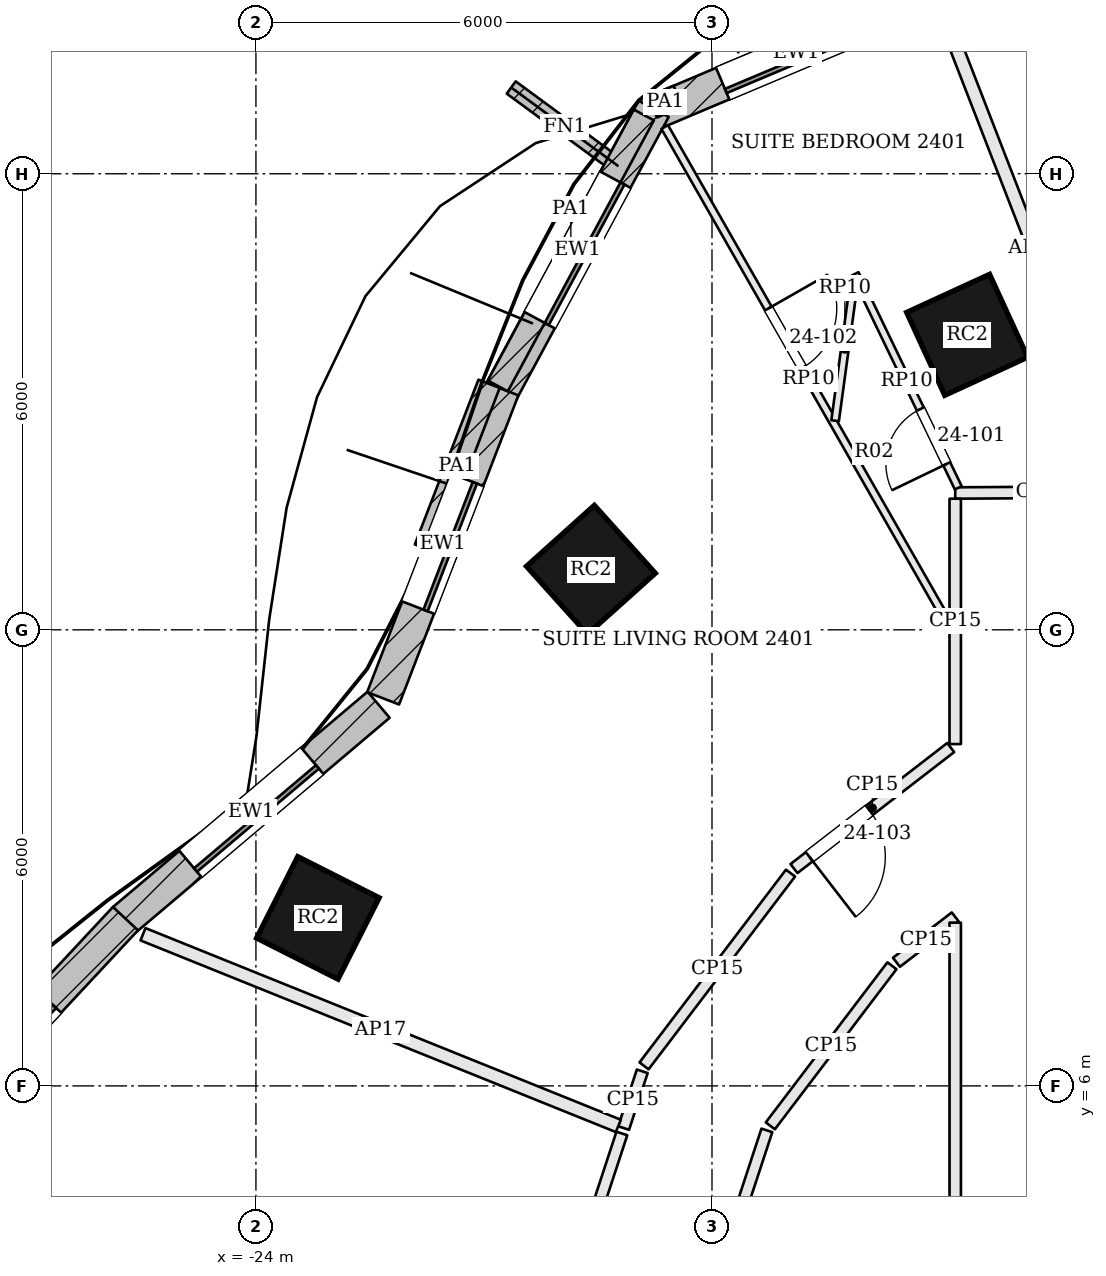
"""IFC4 building model, lengths in metres.
Left out: names, types, materials, properties, quantities, classifications, styles, units other than length and angle.
Written with IfcOpenShell. Run it as: python <this file> out.ifc"""

import sys

from ifc_helpers import new_model, si_unit, direction, frame, frame_2d, origin, origin_2d, place, context, subcontext, project, spatial, rectangle, extrude, element, fill, save


model = new_model("IFC4")
c1 = context("Model", 3, precision=1e-05, world=origin(), true_north=direction((0.0, 1.0)))
c2 = subcontext(c1, "Body", "Model", "MODEL_VIEW")
j1 = project(units=[si_unit("LENGTHUNIT", "METRE"), si_unit("PLANEANGLEUNIT", "RADIAN")], contexts=[c1])
p1 = place(None, origin())
s1 = spatial("IfcSite", under=j1, at=p1, CompositionType="ELEMENT")
p2 = place(p1, origin())
s2 = spatial("IfcBuilding", under=s1, at=p2, CompositionType="ELEMENT")
p3 = place(p2, frame((0.0, 0.0, 103.2)))
s3 = spatial("IfcBuildingStorey", under=s2, at=p3, CompositionType="ELEMENT", Elevation=103.2)
for number, where, z_axis, x_axis in (
    (1, (-14.643, 15.881, 0.0), (0.0, 0.0, 1.0), (-0.909, -0.417, 0.0)),
    (2, (-19.593, 12.79, 0.0), (0.0, 0.0, 1.0), (-0.744, -0.668, 0.0)),
    (3, (-23.185, 8.21, 0.0), (0.0, 0.0, 1.0), (-0.451, -0.893, 0.0)),
):
    element("IfcColumn", number, at=place(p3, frame(where, z_axis=z_axis, x_axis=x_axis)), inside=s3, PredefinedType="COLUMN", context=c2, shape_type="SweptSolid", body=[
        extrude(rectangle(XDim=1.2, YDim=1.2, at=origin_2d()), origin(), (0.0, 0.0, 1.0), 3.6),
    ])
p4 = place(p3, frame((-10.034, 19.259, 0.0), z_axis=(0.0, 0.0, 1.0), x_axis=(-0.974223567844, 0.225584662283, 0.0)))
e4 = element("IfcWall", 4, at=p4, inside=s3, PredefinedType="SOLIDWALL", context=c2, shape_type="SweptSolid", body=[
    extrude(rectangle(XDim=5.139, YDim=0.45, at=frame_2d((2.569, 0.0))), origin(), (0.0, 0.0, 1.0), 3.4),
])
p5 = place(p4, frame((1.519, 0.0, 0.9)))
e5 = element("IfcOpeningElement", 5, at=p5, cuts=e4, PredefinedType="OPENING", context=c2, shape_type="SweptSolid", body=[
    extrude(rectangle(XDim=2.1, YDim=2.0, at=frame_2d((1.05, 1.0))), frame((0.0, 0.235, 0.0), z_axis=(0.0, -1.0, 0.0), x_axis=(1.0, 0.0, 0.0)), (0.0, 0.0, 1.0), 0.47),
])
p6 = place(p3, frame((-14.906, 20.431, 0.0), z_axis=(0.0, 0.0, 1.0), x_axis=(-0.921435803521, -0.388530642279, 0.0)))
e6 = element("IfcWall", 6, at=p6, inside=s3, PredefinedType="SOLIDWALL", context=c2, shape_type="SweptSolid", body=[
    extrude(rectangle(XDim=4.309, YDim=0.45, at=frame_2d((2.154, 0.0))), origin(), (0.0, 0.0, 1.0), 3.4),
])
p7 = place(p6, frame((1.104, 0.0, 0.9)))
e7 = element("IfcOpeningElement", 7, at=p7, cuts=e6, PredefinedType="OPENING", context=c2, shape_type="SweptSolid", body=[
    extrude(rectangle(XDim=2.1, YDim=2.0, at=frame_2d((1.05, 1.0))), frame((0.0, 0.235, 0.0), z_axis=(0.0, -1.0, 0.0), x_axis=(1.0, 0.0, 0.0)), (0.0, 0.0, 1.0), 0.47),
])
p8 = place(p3, frame((-18.767, 18.854, 0.0), z_axis=(0.0, 0.0, 1.0), x_axis=(-0.474475888716, -0.880268499395, 0.0)))
e8 = element("IfcWall", 8, at=p8, inside=s3, PredefinedType="SOLIDWALL", context=c2, shape_type="SweptSolid", body=[
    extrude(rectangle(XDim=4.219, YDim=0.45, at=frame_2d((2.11, 0.0))), origin(), (0.0, 0.0, 1.0), 3.4),
])
p9 = place(p8, frame((1.06, 0.0, 0.9)))
e9 = element("IfcOpeningElement", 9, at=p9, cuts=e8, PredefinedType="OPENING", context=c2, shape_type="SweptSolid", body=[
    extrude(rectangle(XDim=2.1, YDim=2.0, at=frame_2d((1.05, 1.0))), frame((0.0, 0.235, 0.0), z_axis=(0.0, -1.0, 0.0), x_axis=(1.0, 0.0, 0.0)), (0.0, 0.0, 1.0), 0.47),
])
p10 = place(p3, frame((-20.757, 15.166, 0.0), z_axis=(0.0, 0.0, 1.0), x_axis=(-0.360067043581, -0.932926430179, 0.0)))
e10 = element("IfcWall", 10, at=p10, inside=s3, PredefinedType="SOLIDWALL", context=c2, shape_type="SweptSolid", body=[
    extrude(rectangle(XDim=4.36, YDim=0.45, at=frame_2d((2.18, 0.0))), origin(), (0.0, 0.0, 1.0), 3.4),
])
p11 = place(p10, frame((1.28, 0.0, 0.9)))
e11 = element("IfcOpeningElement", 11, at=p11, cuts=e10, PredefinedType="OPENING", context=c2, shape_type="SweptSolid", body=[
    extrude(rectangle(XDim=1.8, YDim=2.0, at=frame_2d((0.9, 1.0))), frame((0.0, 0.235, 0.0), z_axis=(0.0, -1.0, 0.0), x_axis=(1.0, 0.0, 0.0)), (0.0, 0.0, 1.0), 0.47),
])
p12 = place(p3, frame((-22.386, 11.014, 0.0), z_axis=(0.0, 0.0, 1.0), x_axis=(-0.763569952162, -0.645725118108, 0.0)))
e12 = element("IfcWall", 12, at=p12, inside=s3, PredefinedType="SOLIDWALL", context=c2, shape_type="SweptSolid", body=[
    extrude(rectangle(XDim=4.386, YDim=0.45, at=frame_2d((2.193, 0.0))), origin(), (0.0, 0.0, 1.0), 3.4),
])
p13 = place(p12, frame((1.143, 0.0, 0.9)))
e13 = element("IfcOpeningElement", 13, at=p13, cuts=e12, PredefinedType="OPENING", context=c2, shape_type="SweptSolid", body=[
    extrude(rectangle(XDim=2.1, YDim=2.0, at=frame_2d((1.05, 1.0))), frame((0.0, 0.235, 0.0), z_axis=(0.0, -1.0, 0.0), x_axis=(1.0, 0.0, 0.0)), (0.0, 0.0, 1.0), 0.47),
])
p14 = place(p3, frame((-25.717, 8.201, 0.0), z_axis=(0.0, 0.0, 1.0), x_axis=(-0.681990073025, -0.731361429319, 0.0)))
e14 = element("IfcWall", 14, at=p14, inside=s3, PredefinedType="SOLIDWALL", context=c2, shape_type="SweptSolid", body=[
    extrude(rectangle(XDim=5.064, YDim=0.45, at=frame_2d((2.532, 0.0))), origin(), (0.0, 0.0, 1.0), 3.4),
])
p15 = place(p14, frame((1.482, 0.0, 0.9)))
e15 = element("IfcOpeningElement", 15, at=p15, cuts=e14, PredefinedType="OPENING", context=c2, shape_type="SweptSolid", body=[
    extrude(rectangle(XDim=2.1, YDim=2.0, at=frame_2d((1.05, 1.0))), frame((0.0, 0.235, 0.0), z_axis=(0.0, -1.0, 0.0), x_axis=(1.0, 0.0, 0.0)), (0.0, 0.0, 1.0), 0.47),
])
p16 = place(p3, frame((-19.231, 18.099, 0.0), z_axis=(0.0, 0.0, 1.0), x_axis=(-0.806085538754, 0.591799040394, 0.0)))
e16 = element("IfcWall", 16, at=p16, inside=s3, PredefinedType="SOLIDWALL", context=c2, shape_type="SweptSolid", body=[
    extrude(rectangle(XDim=1.75, YDim=0.2, at=frame_2d((0.875, 0.0))), origin(), (0.0, 0.0, 1.0), 3.4),
])
p17 = place(p3, frame((-15.891, 20.097, 3.6), z_axis=(0.0, 0.0, 1.0), x_axis=(-0.921468908678, -0.388452121038, 0.0)))
e17 = element("IfcWall", 17, at=p17, inside=s3, PredefinedType="PARAPET", context=c2, shape_type="SweptSolid", body=[
    extrude(rectangle(XDim=2.099, YDim=0.3, at=frame_2d((1.05, 0.0))), origin(), (0.0, 0.0, 1.0), 1.1),
])
p18 = place(p3, frame((-18.446, 19.02, 3.6), z_axis=(0.0, 0.0, 1.0), x_axis=(-0.921356634102, -0.388718346358, 0.0)))
e18 = element("IfcWall", 18, at=p18, inside=s3, PredefinedType="PARAPET", context=c2, shape_type="SweptSolid", body=[
    extrude(rectangle(XDim=0.363, YDim=0.3, at=frame_2d((0.182, 0.0))), origin(), (0.0, 0.0, 1.0), 1.1),
])
p19 = place(p3, frame((-18.896, 18.773, 3.6), z_axis=(0.0, 0.0, 1.0), x_axis=(-0.474444905835, -0.880285198857, 0.0)))
e19 = element("IfcWall", 19, at=p19, inside=s3, PredefinedType="PARAPET", context=c2, shape_type="SweptSolid", body=[
    extrude(rectangle(XDim=4.05, YDim=0.3, at=frame_2d((2.025, 0.0))), origin(), (0.0, 0.0, 1.0), 1.1),
])
p20 = place(p3, frame((-20.933, 15.237, 3.6), z_axis=(0.0, 0.0, 1.0), x_axis=(-0.360021038217, -0.932944184848, 0.0)))
e20 = element("IfcWall", 20, at=p20, inside=s3, PredefinedType="PARAPET", context=c2, shape_type="SweptSolid", body=[
    extrude(rectangle(XDim=2.323, YDim=0.3, at=frame_2d((1.162, 0.0))), origin(), (0.0, 0.0, 1.0), 1.1),
])
p21 = place(p3, frame((-12.516, 13.814, 0.0), z_axis=(0.0, 0.0, 1.0), x_axis=(-0.999980777107, -0.006200436719, 0.0)))
e21 = element("IfcWall", 21, at=p21, inside=s3, PredefinedType="PARTITIONING", context=c2, shape_type="SweptSolid", body=[
    extrude(rectangle(XDim=2.284, YDim=0.15, at=frame_2d((1.142, 0.0))), origin(), (0.0, 0.0, 1.0), 2.784),
])
p22 = place(p3, frame((-14.8, 13.725, 0.0), z_axis=(0.0, 0.0, 1.0), x_axis=(0.0, -1.0, 0.0)))
e22 = element("IfcWall", 22, at=p22, inside=s3, PredefinedType="PARTITIONING", context=c2, shape_type="SweptSolid", body=[
    extrude(rectangle(XDim=3.228, YDim=0.15, at=frame_2d((1.614, 0.0))), origin(), (0.0, 0.0, 1.0), 2.784),
])
p23 = place(p3, frame((-14.86, 10.451, 0.0), z_axis=(0.0, 0.0, 1.0), x_axis=(-0.791542595332, -0.611113999001, 0.0)))
e23 = element("IfcWall", 23, at=p23, inside=s3, PredefinedType="PARTITIONING", context=c2, shape_type="SweptSolid", body=[
    extrude(rectangle(XDim=2.605, YDim=0.15, at=frame_2d((1.302, 0.0))), origin(), (0.0, 0.0, 1.0), 2.784),
])
p24 = place(p23, frame((1.35, 0.0, 0.0)))
e24 = element("IfcOpeningElement", 24, at=p24, cuts=e23, PredefinedType="OPENING", context=c2, shape_type="SweptSolid", body=[
    extrude(rectangle(XDim=1.0, YDim=2.1, at=frame_2d((0.5, 1.05))), frame((0.0, 0.085, 0.0), z_axis=(0.0, -1.0, 0.0), x_axis=(1.0, 0.0, 0.0)), (0.0, 0.0, 1.0), 0.17),
])
p25 = place(p3, frame((-16.967, 8.8, 0.0), z_axis=(0.0, 0.0, 1.0), x_axis=(-0.604991921991, -0.796231608469, 0.0)))
e25 = element("IfcWall", 25, at=p25, inside=s3, PredefinedType="PARTITIONING", context=c2, shape_type="SweptSolid", body=[
    extrude(rectangle(XDim=3.185, YDim=0.15, at=frame_2d((1.593, 0.0))), origin(), (0.0, 0.0, 1.0), 2.784),
])
p26 = place(p3, frame((-18.917, 6.192, 0.0), z_axis=(0.0, 0.0, 1.0), x_axis=(-0.312217378101, -0.950010688788, 0.0)))
e26 = element("IfcWall", 26, at=p26, inside=s3, PredefinedType="PARTITIONING", context=c2, shape_type="SweptSolid", body=[
    extrude(rectangle(XDim=0.786, YDim=0.15, at=frame_2d((0.393, 0.0))), origin(), (0.0, 0.0, 1.0), 2.784),
])
p27 = place(p3, frame((-14.976, 20.153, 0.0), z_axis=(0.0, 0.0, 1.0), x_axis=(0.361736544099, -0.932280361621, 0.0)))
e27 = element("IfcWall", 27, at=p27, inside=s3, PredefinedType="PARTITIONING", context=c2, shape_type="SweptSolid", body=[
    extrude(rectangle(XDim=6.724, YDim=0.175, at=frame_2d((3.362, 0.0))), origin(), (0.0, 0.0, 1.0), 2.784),
])
p28 = place(p3, frame((-25.486, 7.995, 0.0), z_axis=(0.0, 0.0, 1.0), x_axis=(0.927461928154, -0.373917600314, 0.0)))
e28 = element("IfcWall", 28, at=p28, inside=s3, PredefinedType="PARTITIONING", context=c2, shape_type="SweptSolid", body=[
    extrude(rectangle(XDim=6.743, YDim=0.175, at=frame_2d((3.371, 0.0))), origin(), (0.0, 0.0, 1.0), 2.784),
])
p29 = place(p3, frame((-19.186, 5.374, 0.0), z_axis=(0.0, 0.0, 1.0), x_axis=(-0.312120623237, -0.950042481445, 0.0)))
e29 = element("IfcWall", 29, at=p29, inside=s3, PredefinedType="PARTITIONING", context=c2, shape_type="SweptSolid", body=[
    extrude(rectangle(XDim=2.409, YDim=0.15, at=frame_2d((1.205, 0.0))), origin(), (0.0, 0.0, 1.0), 2.784),
])
p30 = place(p3, frame((-18.134, 2.809, 0.0), z_axis=(0.0, 0.0, 1.0), x_axis=(0.312005223814, 0.950080386237, 0.0)))
e30 = element("IfcWall", 30, at=p30, inside=s3, PredefinedType="PARTITIONING", context=c2, shape_type="SweptSolid", body=[
    extrude(rectangle(XDim=2.743, YDim=0.15, at=frame_2d((1.371, 0.0))), origin(), (0.0, 0.0, 1.0), 2.784),
])
p31 = place(p3, frame((-17.233, 5.475, 0.0), z_axis=(0.0, 0.0, 1.0), x_axis=(0.605024750549, 0.796206663639, 0.0)))
e31 = element("IfcWall", 31, at=p31, inside=s3, PredefinedType="PARTITIONING", context=c2, shape_type="SweptSolid", body=[
    extrude(rectangle(XDim=2.645, YDim=0.15, at=frame_2d((1.322, 0.0))), origin(), (0.0, 0.0, 1.0), 2.784),
])
p32 = place(p3, frame((-15.573, 7.626, 0.0), z_axis=(0.0, 0.0, 1.0), x_axis=(0.791581834002, 0.611063171921, 0.0)))
e32 = element("IfcWall", 32, at=p32, inside=s3, PredefinedType="PARTITIONING", context=c2, shape_type="SweptSolid", body=[
    extrude(rectangle(XDim=0.977, YDim=0.15, at=frame_2d((0.488, 0.0))), origin(), (0.0, 0.0, 1.0), 2.784),
])
p33 = place(p3, frame((-14.8, 8.148, 0.0), z_axis=(0.0, 0.0, 1.0), x_axis=(0.0, -1.0, 0.0)))
e33 = element("IfcWall", 33, at=p33, inside=s3, PredefinedType="PARTITIONING", context=c2, shape_type="SweptSolid", body=[
    extrude(rectangle(XDim=12.948, YDim=0.15, at=frame_2d((6.474, 0.0))), origin(), (0.0, 0.0, 1.0), 2.784),
])
p34 = place(p33, frame((5.536, 0.0, 0.0)))
e34 = element("IfcOpeningElement", 34, at=p34, cuts=e33, PredefinedType="OPENING", context=c2, shape_type="SweptSolid", body=[
    extrude(rectangle(XDim=1.8, YDim=2.1, at=frame_2d((0.9, 1.05))), frame((0.0, 0.085, 0.0), z_axis=(0.0, -1.0, 0.0), x_axis=(1.0, 0.0, 0.0)), (0.0, 0.0, 1.0), 0.17),
])
p35 = place(p3, frame((-18.622, 18.615, 0.0), z_axis=(0.0, 0.0, 1.0), x_axis=(0.495932236656, -0.868361224748, 0.0)))
e35 = element("IfcWall", 35, at=p35, inside=s3, PredefinedType="PARTITIONING", context=c2, shape_type="SweptSolid", body=[
    extrude(rectangle(XDim=7.632, YDim=0.1, at=frame_2d((3.816, 0.0))), origin(), (0.0, 0.0, 1.0), 2.784),
])
p36 = place(p35, frame((2.75, 0.0, 0.0)))
e36 = element("IfcOpeningElement", 36, at=p36, cuts=e35, PredefinedType="OPENING", context=c2, shape_type="SweptSolid", body=[
    extrude(rectangle(XDim=0.9, YDim=2.4, at=frame_2d((0.45, 1.2))), frame((0.0, 0.06, 0.0), z_axis=(0.0, -1.0, 0.0), x_axis=(1.0, 0.0, 0.0)), (0.0, 0.0, 1.0), 0.12),
])
p37 = place(p3, frame((-14.76, 13.868, 0.0), z_axis=(0.0, 0.0, 1.0), x_axis=(-0.434165602695, 0.900833075234, 0.0)))
e37 = element("IfcWall", 37, at=p37, inside=s3, PredefinedType="PARTITIONING", context=c2, shape_type="SweptSolid", body=[
    extrude(rectangle(XDim=3.125, YDim=0.1, at=frame_2d((1.562, 0.0))), origin(), (0.0, 0.0, 1.0), 2.784),
])
p38 = place(p37, frame((0.35, 0.0, 0.0)))
e38 = element("IfcOpeningElement", 38, at=p38, cuts=e37, PredefinedType="OPENING", context=c2, shape_type="SweptSolid", body=[
    extrude(rectangle(XDim=0.8, YDim=2.1, at=frame_2d((0.4, 1.05))), frame((0.0, 0.06, 0.0), z_axis=(0.0, -1.0, 0.0), x_axis=(1.0, 0.0, 0.0)), (0.0, 0.0, 1.0), 0.12),
])
p39 = place(p3, frame((-16.124, 16.634, 0.0), z_axis=(0.0, 0.0, 1.0), x_axis=(-0.135050128955, -0.990838767242, 0.0)))
e39 = element("IfcWall", 39, at=p39, inside=s3, PredefinedType="PARTITIONING", context=c2, shape_type="SweptSolid", body=[
    extrude(rectangle(XDim=1.9, YDim=0.1, at=frame_2d((0.95, 0.0))), origin(), (0.0, 0.0, 1.0), 2.784),
])
p40 = place(p7, origin())
e40 = element("IfcWindow", 40, at=p40, inside=s3, PartitioningType="SINGLE_PANEL", PredefinedType="WINDOW", context=c2, shape_type="SweptSolid", body=[
    extrude(rectangle(XDim=2.1, YDim=2.0, at=frame_2d((1.05, 1.0))), frame((0.0, 0.135, 0.0), z_axis=(0.0, -1.0, 0.0), x_axis=(1.0, 0.0, 0.0)), (0.0, 0.0, 1.0), 0.06),
])
fill(e7, e40)
p41 = place(p9, origin())
e41 = element("IfcWindow", 41, at=p41, inside=s3, PartitioningType="SINGLE_PANEL", PredefinedType="WINDOW", context=c2, shape_type="SweptSolid", body=[
    extrude(rectangle(XDim=2.1, YDim=2.0, at=frame_2d((1.05, 1.0))), frame((0.0, 0.135, 0.0), z_axis=(0.0, -1.0, 0.0), x_axis=(1.0, 0.0, 0.0)), (0.0, 0.0, 1.0), 0.06),
])
fill(e9, e41)
p42 = place(p11, origin())
e42 = element("IfcWindow", 42, at=p42, inside=s3, PartitioningType="SINGLE_PANEL", PredefinedType="WINDOW", context=c2, shape_type="SweptSolid", body=[
    extrude(rectangle(XDim=1.8, YDim=2.0, at=frame_2d((0.9, 1.0))), frame((0.0, 0.135, 0.0), z_axis=(0.0, -1.0, 0.0), x_axis=(1.0, 0.0, 0.0)), (0.0, 0.0, 1.0), 0.06),
])
fill(e11, e42)
p43 = place(p13, origin())
e43 = element("IfcWindow", 43, at=p43, inside=s3, PartitioningType="SINGLE_PANEL", PredefinedType="WINDOW", context=c2, shape_type="SweptSolid", body=[
    extrude(rectangle(XDim=2.1, YDim=2.0, at=frame_2d((1.05, 1.0))), frame((0.0, 0.135, 0.0), z_axis=(0.0, -1.0, 0.0), x_axis=(1.0, 0.0, 0.0)), (0.0, 0.0, 1.0), 0.06),
])
fill(e13, e43)
p44 = place(p15, origin())
e44 = element("IfcWindow", 44, at=p44, inside=s3, PartitioningType="SINGLE_PANEL", PredefinedType="WINDOW", context=c2, shape_type="SweptSolid", body=[
    extrude(rectangle(XDim=2.1, YDim=2.0, at=frame_2d((1.05, 1.0))), frame((0.0, 0.135, 0.0), z_axis=(0.0, -1.0, 0.0), x_axis=(1.0, 0.0, 0.0)), (0.0, 0.0, 1.0), 0.06),
])
fill(e15, e44)
p45 = place(p38, origin())
e45 = element("IfcDoor", 45, at=p45, inside=s3, OperationType="SINGLE_SWING_LEFT", PredefinedType="DOOR", context=c2, shape_type="SweptSolid", body=[
    extrude(rectangle(XDim=0.8, YDim=2.1, at=frame_2d((0.4, 1.05))), frame((0.0, 0.025, 0.0), z_axis=(0.0, -1.0, 0.0), x_axis=(1.0, 0.0, 0.0)), (0.0, 0.0, 1.0), 0.05),
])
fill(e38, e45)
p46 = place(p36, origin())
e46 = element("IfcDoor", 46, at=p46, inside=s3, OperationType="SINGLE_SWING_LEFT", PredefinedType="DOOR", context=c2, shape_type="SweptSolid", body=[
    extrude(rectangle(XDim=0.9, YDim=2.4, at=frame_2d((0.45, 1.2))), frame((0.0, 0.025, 0.0), z_axis=(0.0, -1.0, 0.0), x_axis=(1.0, 0.0, 0.0)), (0.0, 0.0, 1.0), 0.05),
])
fill(e36, e46)
p47 = place(p24, origin())
e47 = element("IfcDoor", 47, at=p47, inside=s3, OperationType="SINGLE_SWING_RIGHT", PredefinedType="DOOR", context=c2, shape_type="SweptSolid", body=[
    extrude(rectangle(XDim=1.0, YDim=2.1, at=frame_2d((0.5, 1.05))), frame((0.0, 0.025, 0.0), z_axis=(0.0, -1.0, 0.0), x_axis=(1.0, 0.0, 0.0)), (0.0, 0.0, 1.0), 0.05),
])
fill(e24, e47)
save(model, sys.argv[1])
